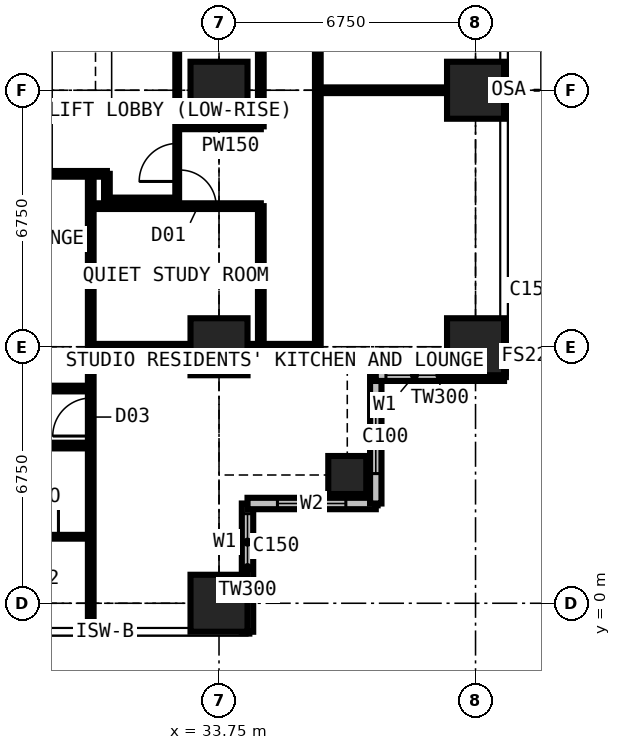
"""IFC4 building model, lengths in metres.
Left out: names, types, materials, properties, quantities, classifications, styles, units other than length and angle.
Written with IfcOpenShell. Run it as: python <this file> out.ifc"""

import sys

from ifc_helpers import new_model, si_unit, direction, frame, frame_2d, origin, origin_2d, place, context, subcontext, project, spatial, rectangle, extrude, element, fill, save


model = new_model("IFC4")
c1 = context("Model", 3, precision=1e-05, world=origin(), true_north=direction((0.0, 1.0)))
c2 = subcontext(c1, "Body", "Model", "MODEL_VIEW")
j1 = project(units=[si_unit("LENGTHUNIT", "METRE"), si_unit("PLANEANGLEUNIT", "RADIAN")], contexts=[c1])
p1 = place(None, origin())
s1 = spatial("IfcSite", under=j1, at=p1, CompositionType="ELEMENT")
p2 = place(p1, origin())
s2 = spatial("IfcBuilding", under=s1, at=p2, CompositionType="ELEMENT")
p3 = place(p2, frame((0.0, 0.0, 112.5)))
s3 = spatial("IfcBuildingStorey", under=s2, at=p3, CompositionType="ELEMENT", Elevation=112.5)
for number, where, z_axis, x_axis in (
    (1, (33.75, 0.0, 0.0), (0.0, 0.0, 1.0), (1.0, 0.0, 0.0)),
    (2, (33.75, 6.75, 0.0), (0.0, 0.0, 1.0), (1.0, 0.0, 0.0)),
    (3, (33.75, 13.5, 0.0), (0.0, 0.0, 1.0), (1.0, 0.0, 0.0)),
):
    element("IfcColumn", number, at=place(p3, frame(where, z_axis=z_axis, x_axis=x_axis)), inside=s3, PredefinedType="COLUMN", context=c2, shape_type="SweptSolid", body=[
        extrude(rectangle(XDim=1.5, YDim=1.5, at=origin_2d()), origin(), (0.0, 0.0, 1.0), 3.6),
    ])
p4 = place(p3, frame((37.125, 3.375, 0.0), z_axis=(0.0, 0.0, 1.0), x_axis=(1.0, 0.0, 0.0)))
e4 = element("IfcColumn", 4, at=p4, inside=s3, PredefinedType="COLUMN", context=c2, shape_type="SweptSolid", body=[
    extrude(rectangle(XDim=1.0, YDim=1.0, at=origin_2d()), origin(), (0.0, 0.0, 1.0), 3.6),
])
for number, where, z_axis, x_axis in (
    (5, (40.5, 6.75, 0.0), (0.0, 0.0, 1.0), (1.0, 0.0, 0.0)),
    (6, (40.5, 13.5, 0.0), (0.0, 0.0, 1.0), (1.0, 0.0, 0.0)),
):
    element("IfcColumn", number, at=place(p3, frame(where, z_axis=z_axis, x_axis=x_axis)), inside=s3, PredefinedType="COLUMN", context=c2, shape_type="SweptSolid", body=[
        extrude(rectangle(XDim=1.5, YDim=1.5, at=origin_2d()), origin(), (0.0, 0.0, 1.0), 3.6),
    ])
p5 = place(p3, frame((34.5, -0.75, 0.0), z_axis=(0.0, 0.0, 1.0), x_axis=(0.0, 1.0, 0.0)))
e7 = element("IfcWall", 7, at=p5, inside=s3, PredefinedType="SOLIDWALL", context=c2, shape_type="SweptSolid", body=[
    extrude(rectangle(XDim=3.375, YDim=0.3, at=frame_2d((1.688, 0.0))), origin(), (0.0, 0.0, 1.0), 3.375),
])
p6 = place(p5, frame((1.607, 0.0, 0.9)))
e8 = element("IfcOpeningElement", 8, at=p6, cuts=e7, PredefinedType="OPENING", context=c2, shape_type="SweptSolid", body=[
    extrude(rectangle(XDim=1.5, YDim=1.8, at=frame_2d((0.75, 0.9))), frame((0.0, 0.16, 0.0), z_axis=(0.0, -1.0, 0.0), x_axis=(1.0, 0.0, 0.0)), (0.0, 0.0, 1.0), 0.32),
])
p7 = place(p3, frame((34.5, 2.625, 0.0), z_axis=(0.0, 0.0, 1.0), x_axis=(1.0, 0.0, 0.0)))
e9 = element("IfcWall", 9, at=p7, inside=s3, PredefinedType="SOLIDWALL", context=c2, shape_type="SweptSolid", body=[
    extrude(rectangle(XDim=3.375, YDim=0.3, at=frame_2d((1.688, 0.0))), origin(), (0.0, 0.0, 1.0), 3.375),
])
p8 = place(p7, frame((0.788, 0.0, 0.6)))
e10 = element("IfcOpeningElement", 10, at=p8, cuts=e9, PredefinedType="OPENING", context=c2, shape_type="SweptSolid", body=[
    extrude(rectangle(XDim=1.8, YDim=2.1, at=frame_2d((0.9, 1.05))), frame((0.0, 0.16, 0.0), z_axis=(0.0, -1.0, 0.0), x_axis=(1.0, 0.0, 0.0)), (0.0, 0.0, 1.0), 0.32),
])
p9 = place(p3, frame((37.875, 2.625, 0.0), z_axis=(0.0, 0.0, 1.0), x_axis=(0.0, 1.0, 0.0)))
e11 = element("IfcWall", 11, at=p9, inside=s3, PredefinedType="SOLIDWALL", context=c2, shape_type="SweptSolid", body=[
    extrude(rectangle(XDim=3.375, YDim=0.3, at=frame_2d((1.688, 0.0))), origin(), (0.0, 0.0, 1.0), 3.375),
])
p10 = place(p9, frame((0.788, 0.0, 0.6)))
e12 = element("IfcOpeningElement", 12, at=p10, cuts=e11, PredefinedType="OPENING", context=c2, shape_type="SweptSolid", body=[
    extrude(rectangle(XDim=1.8, YDim=2.1, at=frame_2d((0.9, 1.05))), frame((0.0, 0.16, 0.0), z_axis=(0.0, -1.0, 0.0), x_axis=(1.0, 0.0, 0.0)), (0.0, 0.0, 1.0), 0.32),
])
p11 = place(p3, frame((37.875, 6.0, 0.0), z_axis=(0.0, 0.0, 1.0), x_axis=(1.0, 0.0, 0.0)))
e13 = element("IfcWall", 13, at=p11, inside=s3, PredefinedType="SOLIDWALL", context=c2, shape_type="SweptSolid", body=[
    extrude(rectangle(XDim=3.375, YDim=0.3, at=frame_2d((1.688, 0.0))), origin(), (0.0, 0.0, 1.0), 3.375),
])
p12 = place(p11, frame((0.268, 0.0, 0.9)))
e14 = element("IfcOpeningElement", 14, at=p12, cuts=e13, PredefinedType="OPENING", context=c2, shape_type="SweptSolid", body=[
    extrude(rectangle(XDim=1.5, YDim=1.8, at=frame_2d((0.75, 0.9))), frame((0.0, 0.16, 0.0), z_axis=(0.0, -1.0, 0.0), x_axis=(1.0, 0.0, 0.0)), (0.0, 0.0, 1.0), 0.32),
])
p13 = place(p3, frame((6.75, 4.15, 0.0), z_axis=(0.0, 0.0, 1.0), x_axis=(1.0, 0.0, 0.0)))
e15 = element("IfcWall", 15, at=p13, inside=s3, PredefinedType="PARTITIONING", context=c2, shape_type="SweptSolid", body=[
    extrude(rectangle(XDim=23.625, YDim=0.15, at=frame_2d((11.812, 0.0))), origin(), (0.0, 0.0, 1.0), 3.375),
])
p14 = place(p13, frame((1.2, 0.0, 0.0)))
e16 = element("IfcOpeningElement", 16, at=p14, cuts=e15, PredefinedType="OPENING", context=c2, shape_type="SweptSolid", body=[
    extrude(rectangle(XDim=1.0, YDim=2.2, at=frame_2d((0.5, 1.1))), frame((0.0, 0.085, 0.0), z_axis=(0.0, -1.0, 0.0), x_axis=(1.0, 0.0, 0.0)), (0.0, 0.0, 1.0), 0.17),
])
p15 = place(p13, frame((18.475, 0.0, 0.0)))
e17 = element("IfcOpeningElement", 17, at=p15, cuts=e15, PredefinedType="OPENING", context=c2, shape_type="SweptSolid", body=[
    extrude(rectangle(XDim=0.95, YDim=2.2, at=frame_2d((0.475, 1.1))), frame((0.0, 0.085, 0.0), z_axis=(0.0, -1.0, 0.0), x_axis=(1.0, 0.0, 0.0)), (0.0, 0.0, 1.0), 0.17),
])
p16 = place(p13, frame((11.725, 0.0, 0.0)))
e18 = element("IfcOpeningElement", 18, at=p16, cuts=e15, PredefinedType="OPENING", context=c2, shape_type="SweptSolid", body=[
    extrude(rectangle(XDim=0.95, YDim=2.2, at=frame_2d((0.475, 1.1))), frame((0.0, 0.085, 0.0), z_axis=(0.0, -1.0, 0.0), x_axis=(1.0, 0.0, 0.0)), (0.0, 0.0, 1.0), 0.17),
])
p17 = place(p13, frame((4.975, 0.0, 0.0)))
e19 = element("IfcOpeningElement", 19, at=p17, cuts=e15, PredefinedType="OPENING", context=c2, shape_type="SweptSolid", body=[
    extrude(rectangle(XDim=0.95, YDim=2.2, at=frame_2d((0.475, 1.1))), frame((0.0, 0.085, 0.0), z_axis=(0.0, -1.0, 0.0), x_axis=(1.0, 0.0, 0.0)), (0.0, 0.0, 1.0), 0.17),
])
p18 = place(p3, frame((10.125, 11.3, 0.0), z_axis=(0.0, 0.0, 1.0), x_axis=(1.0, 0.0, 0.0)))
e20 = element("IfcWall", 20, at=p18, inside=s3, PredefinedType="PARTITIONING", context=c2, shape_type="SweptSolid", body=[
    extrude(rectangle(XDim=20.675, YDim=0.15, at=frame_2d((10.337, 0.0))), origin(), (0.0, 0.0, 1.0), 3.375),
])
p19 = place(p18, frame((11.312, 0.0, 0.0)))
e21 = element("IfcOpeningElement", 21, at=p19, cuts=e20, PredefinedType="OPENING", context=c2, shape_type="SweptSolid", body=[
    extrude(rectangle(XDim=1.0, YDim=2.2, at=frame_2d((0.5, 1.1))), frame((0.0, 0.085, 0.0), z_axis=(0.0, -1.0, 0.0), x_axis=(1.0, 0.0, 0.0)), (0.0, 0.0, 1.0), 0.17),
])
p20 = place(p3, frame((22.988, 5.65, 0.0), z_axis=(0.0, 0.0, 1.0), x_axis=(1.0, 0.0, 0.0)))
e22 = element("IfcWall", 22, at=p20, inside=s3, PredefinedType="PARTITIONING", context=c2, shape_type="SweptSolid", body=[
    extrude(rectangle(XDim=7.387, YDim=0.15, at=frame_2d((3.694, 0.0))), origin(), (0.0, 0.0, 1.0), 3.375),
])
p21 = place(p20, frame((2.3, 0.0, 0.0)))
e23 = element("IfcOpeningElement", 23, at=p21, cuts=e22, PredefinedType="OPENING", context=c2, shape_type="SweptSolid", body=[
    extrude(rectangle(XDim=0.95, YDim=2.2, at=frame_2d((0.475, 1.1))), frame((0.0, 0.085, 0.0), z_axis=(0.0, -1.0, 0.0), x_axis=(1.0, 0.0, 0.0)), (0.0, 0.0, 1.0), 0.17),
])
p22 = place(p3, frame((27.775, 1.75, 0.0), z_axis=(0.0, 0.0, 1.0), x_axis=(1.0, 0.0, 0.0)))
e24 = element("IfcWall", 24, at=p22, inside=s3, PredefinedType="PARTITIONING", context=c2, shape_type="SweptSolid", body=[
    extrude(rectangle(XDim=2.6, YDim=0.1, at=frame_2d((1.3, 0.0))), origin(), (0.0, 0.0, 1.0), 3.375),
])
p23 = place(p22, frame((0.85, 0.0, 0.0)))
e25 = element("IfcOpeningElement", 25, at=p23, cuts=e24, PredefinedType="OPENING", context=c2, shape_type="SweptSolid", body=[
    extrude(rectangle(XDim=0.9, YDim=2.2, at=frame_2d((0.45, 1.1))), frame((0.0, 0.06, 0.0), z_axis=(0.0, -1.0, 0.0), x_axis=(1.0, 0.0, 0.0)), (0.0, 0.0, 1.0), 0.12),
])
p24 = place(p3, frame((30.375, -0.734, 0.0), z_axis=(0.0, 0.0, 1.0), x_axis=(0.0, 1.0, 0.0)))
e26 = element("IfcWall", 26, at=p24, inside=s3, PredefinedType="PARTITIONING", context=c2, shape_type="SweptSolid", body=[
    extrude(rectangle(XDim=12.034, YDim=0.15, at=frame_2d((6.017, 0.0))), origin(), (0.0, 0.0, 1.0), 3.375),
])
p25 = place(p24, frame((5.134, 0.0, 0.0)))
e27 = element("IfcOpeningElement", 27, at=p25, cuts=e26, PredefinedType="OPENING", context=c2, shape_type="SweptSolid", body=[
    extrude(rectangle(XDim=1.0, YDim=2.2, at=frame_2d((0.5, 1.1))), frame((0.0, 0.085, 0.0), z_axis=(0.0, -1.0, 0.0), x_axis=(1.0, 0.0, 0.0)), (0.0, 0.0, 1.0), 0.17),
])
p26 = place(p3, frame((30.375, 6.75, 0.0), z_axis=(0.0, 0.0, 1.0), x_axis=(1.0, 0.0, 0.0)))
e28 = element("IfcWall", 28, at=p26, inside=s3, PredefinedType="PARTITIONING", context=c2, shape_type="SweptSolid", body=[
    extrude(rectangle(XDim=5.975, YDim=0.15, at=frame_2d((2.988, 0.0))), origin(), (0.0, 0.0, 1.0), 2.877),
])
p27 = place(p3, frame((30.375, 10.45, 0.0), z_axis=(0.0, 0.0, 1.0), x_axis=(1.0, 0.0, 0.0)))
e29 = element("IfcWall", 29, at=p27, inside=s3, PredefinedType="PARTITIONING", context=c2, shape_type="SweptSolid", body=[
    extrude(rectangle(XDim=4.475, YDim=0.15, at=frame_2d((2.238, 0.0))), origin(), (0.0, 0.0, 1.0), 3.375),
])
p28 = place(p27, frame((2.35, 0.0, 0.0)))
e30 = element("IfcOpeningElement", 30, at=p28, cuts=e29, PredefinedType="OPENING", context=c2, shape_type="SweptSolid", body=[
    extrude(rectangle(XDim=0.95, YDim=2.2, at=frame_2d((0.475, 1.1))), frame((0.0, 0.085, 0.0), z_axis=(0.0, -1.0, 0.0), x_axis=(1.0, 0.0, 0.0)), (0.0, 0.0, 1.0), 0.17),
])
p29 = place(p3, frame((30.8, 10.6, 0.0), z_axis=(0.0, 0.0, 1.0), x_axis=(0.0, 1.0, 0.0)))
e31 = element("IfcWall", 31, at=p29, inside=s3, PredefinedType="PARTITIONING", context=c2, shape_type="SweptSolid", body=[
    extrude(rectangle(XDim=0.7, YDim=0.15, at=frame_2d((0.35, 0.0))), origin(), (0.0, 0.0, 1.0), 3.375),
])
p30 = place(p3, frame((30.8, 10.6, 0.0), z_axis=(0.0, 0.0, 1.0), x_axis=(1.0, 0.0, 0.0)))
e32 = element("IfcWall", 32, at=p30, inside=s3, PredefinedType="PARTITIONING", context=c2, shape_type="SweptSolid", body=[
    extrude(rectangle(XDim=1.85, YDim=0.15, at=frame_2d((0.925, 0.0))), origin(), (0.0, 0.0, 1.0), 3.375),
])
p31 = place(p3, frame((32.65, 10.6, 0.0), z_axis=(0.0, 0.0, 1.0), x_axis=(0.0, 1.0, 0.0)))
e33 = element("IfcWall", 33, at=p31, inside=s3, PredefinedType="SHEAR", context=c2, shape_type="SweptSolid", body=[
    extrude(rectangle(XDim=9.3, YDim=0.1, at=frame_2d((4.65, 0.0))), origin(), (0.0, 0.0, 1.0), 3.375),
])
p32 = place(p31, frame((0.5, 0.0, 0.0)))
e34 = element("IfcOpeningElement", 34, at=p32, cuts=e33, PredefinedType="OPENING", context=c2, shape_type="SweptSolid", body=[
    extrude(rectangle(XDim=1.0, YDim=2.2, at=frame_2d((0.5, 1.1))), frame((0.0, 0.06, 0.0), z_axis=(0.0, -1.0, 0.0), x_axis=(1.0, 0.0, 0.0)), (0.0, 0.0, 1.0), 0.12),
])
p33 = place(p3, frame((32.65, 12.55, 0.0), z_axis=(0.0, 0.0, 1.0), x_axis=(1.0, 0.0, 0.0)))
e35 = element("IfcWall", 35, at=p33, inside=s3, PredefinedType="PARTITIONING", context=c2, shape_type="SweptSolid", body=[
    extrude(rectangle(XDim=2.2, YDim=0.15, at=frame_2d((1.1, 0.0))), origin(), (0.0, 0.0, 1.0), 3.375),
])
p34 = place(p3, frame((34.85, 6.75, 0.0), z_axis=(0.0, 0.0, 1.0), x_axis=(0.0, 1.0, 0.0)))
e36 = element("IfcWall", 36, at=p34, inside=s3, PredefinedType="PARTITIONING", context=c2, shape_type="SweptSolid", body=[
    extrude(rectangle(XDim=3.7, YDim=0.15, at=frame_2d((1.85, 0.0))), origin(), (0.0, 0.0, 1.0), 3.375),
])
p35 = place(p3, frame((34.85, 12.55, 0.0), z_axis=(0.0, 0.0, 1.0), x_axis=(0.0, 1.0, 0.0)))
e37 = element("IfcWall", 37, at=p35, inside=s3, PredefinedType="PARTITIONING", context=c2, shape_type="SweptSolid", body=[
    extrude(rectangle(XDim=17.825, YDim=0.15, at=frame_2d((8.913, 0.0))), origin(), (0.0, 0.0, 1.0), 3.375),
])
p36 = place(p35, frame((8.5, 0.0, 0.0)))
e38 = element("IfcOpeningElement", 38, at=p36, cuts=e37, PredefinedType="OPENING", context=c2, shape_type="SweptSolid", body=[
    extrude(rectangle(XDim=0.95, YDim=2.2, at=frame_2d((0.475, 1.1))), frame((0.0, 0.085, 0.0), z_axis=(0.0, -1.0, 0.0), x_axis=(1.0, 0.0, 0.0)), (0.0, 0.0, 1.0), 0.17),
])
p37 = place(p3, frame((36.35, 6.75, 0.0), z_axis=(0.0, 0.0, 1.0), x_axis=(0.0, 1.0, 0.0)))
e39 = element("IfcWall", 39, at=p37, inside=s3, PredefinedType="PARTITIONING", context=c2, shape_type="SweptSolid", body=[
    extrude(rectangle(XDim=20.25, YDim=0.15, at=frame_2d((10.125, 0.0))), origin(), (0.0, 0.0, 1.0), 3.375),
])
p38 = place(p37, frame((15.1, 0.0, 0.0)))
e40 = element("IfcOpeningElement", 40, at=p38, cuts=e39, PredefinedType="OPENING", context=c2, shape_type="SweptSolid", body=[
    extrude(rectangle(XDim=0.95, YDim=2.2, at=frame_2d((0.475, 1.1))), frame((0.0, 0.085, 0.0), z_axis=(0.0, -1.0, 0.0), x_axis=(1.0, 0.0, 0.0)), (0.0, 0.0, 1.0), 0.17),
])
p39 = place(p37, frame((8.35, 0.0, 0.0)))
e41 = element("IfcOpeningElement", 41, at=p39, cuts=e39, PredefinedType="OPENING", context=c2, shape_type="SweptSolid", body=[
    extrude(rectangle(XDim=0.95, YDim=2.2, at=frame_2d((0.475, 1.1))), frame((0.0, 0.085, 0.0), z_axis=(0.0, -1.0, 0.0), x_axis=(1.0, 0.0, 0.0)), (0.0, 0.0, 1.0), 0.17),
])
p40 = place(p3, frame((36.35, 13.5, 0.0), z_axis=(0.0, 0.0, 1.0), x_axis=(1.0, 0.0, 0.0)))
e42 = element("IfcWall", 42, at=p40, inside=s3, PredefinedType="PARTITIONING", context=c2, shape_type="SweptSolid", body=[
    extrude(rectangle(XDim=4.884, YDim=0.15, at=frame_2d((2.442, 0.0))), origin(), (0.0, 0.0, 1.0), 2.61),
])
p41 = place(p6, origin())
e43 = element("IfcWindow", 43, at=p41, inside=s3, PartitioningType="SINGLE_PANEL", PredefinedType="WINDOW", context=c2, shape_type="SweptSolid", body=[
    extrude(rectangle(XDim=1.5, YDim=1.8, at=frame_2d((0.75, 0.9))), frame((0.0, 0.03, 0.0), z_axis=(0.0, -1.0, 0.0), x_axis=(1.0, 0.0, 0.0)), (0.0, 0.0, 1.0), 0.06),
])
fill(e8, e43)
p42 = place(p8, origin())
e44 = element("IfcWindow", 44, at=p42, inside=s3, PartitioningType="SINGLE_PANEL", PredefinedType="WINDOW", context=c2, shape_type="SweptSolid", body=[
    extrude(rectangle(XDim=1.8, YDim=2.1, at=frame_2d((0.9, 1.05))), frame((0.0, 0.03, 0.0), z_axis=(0.0, -1.0, 0.0), x_axis=(1.0, 0.0, 0.0)), (0.0, 0.0, 1.0), 0.06),
])
fill(e10, e44)
p43 = place(p10, origin())
e45 = element("IfcWindow", 45, at=p43, inside=s3, PartitioningType="SINGLE_PANEL", PredefinedType="WINDOW", context=c2, shape_type="SweptSolid", body=[
    extrude(rectangle(XDim=1.8, YDim=2.1, at=frame_2d((0.9, 1.05))), frame((0.0, 0.03, 0.0), z_axis=(0.0, -1.0, 0.0), x_axis=(1.0, 0.0, 0.0)), (0.0, 0.0, 1.0), 0.06),
])
fill(e12, e45)
p44 = place(p12, origin())
e46 = element("IfcWindow", 46, at=p44, inside=s3, PartitioningType="SINGLE_PANEL", PredefinedType="WINDOW", context=c2, shape_type="SweptSolid", body=[
    extrude(rectangle(XDim=1.5, YDim=1.8, at=frame_2d((0.75, 0.9))), frame((0.0, 0.03, 0.0), z_axis=(0.0, -1.0, 0.0), x_axis=(1.0, 0.0, 0.0)), (0.0, 0.0, 1.0), 0.06),
])
fill(e14, e46)
p45 = place(p23, origin())
e47 = element("IfcDoor", 47, at=p45, inside=s3, OperationType="SINGLE_SWING_RIGHT", PredefinedType="DOOR", context=c2, shape_type="SweptSolid", body=[
    extrude(rectangle(XDim=0.9, YDim=2.2, at=frame_2d((0.45, 1.1))), frame((0.0, 0.025, 0.0), z_axis=(0.0, -1.0, 0.0), x_axis=(1.0, 0.0, 0.0)), (0.0, 0.0, 1.0), 0.05),
])
fill(e25, e47)
p46 = place(p25, origin())
e48 = element("IfcDoor", 48, at=p46, inside=s3, OperationType="SINGLE_SWING_LEFT", PredefinedType="DOOR", context=c2, shape_type="SweptSolid", body=[
    extrude(rectangle(XDim=1.0, YDim=2.2, at=frame_2d((0.5, 1.1))), frame((0.0, 0.025, 0.0), z_axis=(0.0, -1.0, 0.0), x_axis=(1.0, 0.0, 0.0)), (0.0, 0.0, 1.0), 0.05),
])
fill(e27, e48)
p47 = place(p32, origin())
e49 = element("IfcDoor", 49, at=p47, inside=s3, OperationType="SINGLE_SWING_LEFT", PredefinedType="DOOR", context=c2, shape_type="SweptSolid", body=[
    extrude(rectangle(XDim=1.0, YDim=2.2, at=frame_2d((0.5, 1.1))), frame((0.0, 0.025, 0.0), z_axis=(0.0, -1.0, 0.0), x_axis=(1.0, 0.0, 0.0)), (0.0, 0.0, 1.0), 0.05),
])
fill(e34, e49)
p48 = place(p28, origin())
e50 = element("IfcDoor", 50, at=p48, inside=s3, OperationType="SINGLE_SWING_LEFT", PredefinedType="DOOR", context=c2, shape_type="SweptSolid", body=[
    extrude(rectangle(XDim=0.95, YDim=2.2, at=frame_2d((0.475, 1.1))), frame((0.0, 0.025, 0.0), z_axis=(0.0, -1.0, 0.0), x_axis=(1.0, 0.0, 0.0)), (0.0, 0.0, 1.0), 0.05),
])
fill(e30, e50)
save(model, sys.argv[1])
